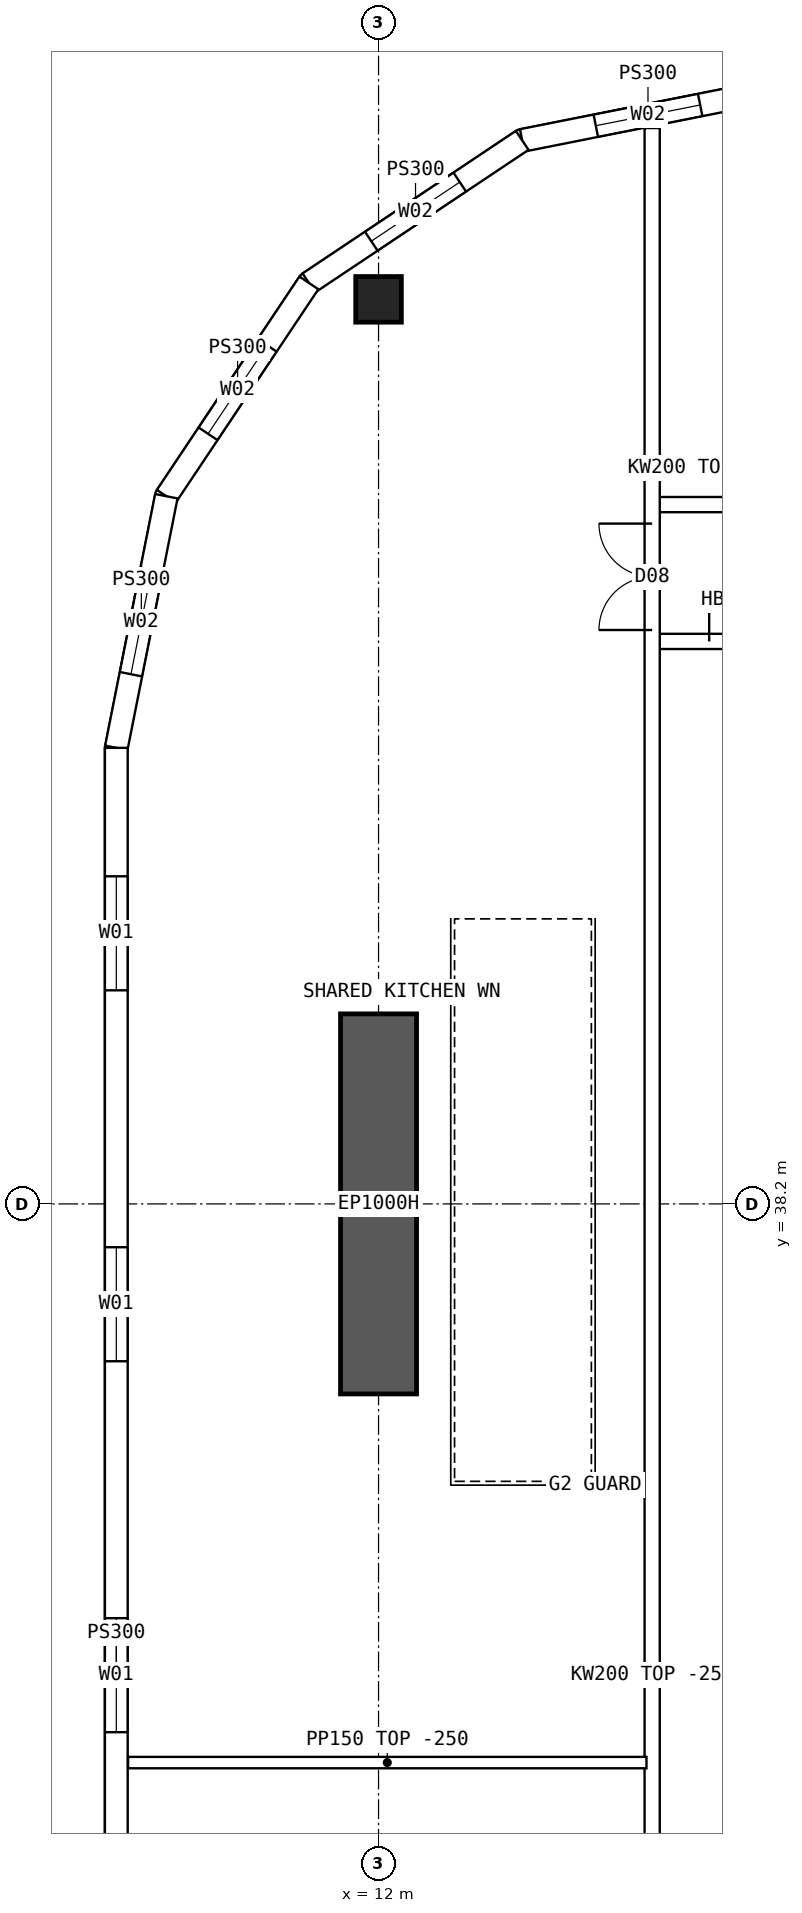
"""IFC4 building model, lengths in metres.
Left out: names, types, materials, properties, quantities, classifications, styles, units other than length and angle.
Written with IfcOpenShell. Run it as: python <this file> out.ifc"""

import sys

from ifc_helpers import new_model, si_unit, direction, frame, frame_2d, origin, origin_2d, place, context, subcontext, project, spatial, polyline, rectangle, hollow_rectangle, outline, extrude, element, fill, save


model = new_model("IFC4")
c1 = context("Model", 3, precision=1e-05, world=origin(), true_north=direction((0.0, 1.0)))
c2 = subcontext(c1, "Body", "Model", "MODEL_VIEW")
j1 = project(units=[si_unit("LENGTHUNIT", "METRE"), si_unit("PLANEANGLEUNIT", "RADIAN")], contexts=[c1])
p1 = place(None, origin())
s1 = spatial("IfcSite", under=j1, at=p1, CompositionType="ELEMENT")
p2 = place(p1, origin())
s2 = spatial("IfcBuilding", under=s1, at=p2, CompositionType="ELEMENT")
p3 = place(p2, frame((0.0, 0.0, 220.3)))
s3 = spatial("IfcBuildingStorey", under=s2, at=p3, CompositionType="ELEMENT", Elevation=220.3)
p4 = place(p3, frame((12.0, 50.1, 0.0), z_axis=(0.0, 0.0, 1.0), x_axis=(1.0, 0.0, 0.0)))
e1 = element("IfcColumn", 1, at=p4, inside=s3, PredefinedType="COLUMN", context=c2, shape_type="SweptSolid", body=[
    extrude(hollow_rectangle(XDim=0.6, YDim=0.6, WallThickness=0.06, at=origin_2d()), origin(), (0.0, 0.0, 1.0), 3.75),
])
p5 = place(p3, frame((12.0, 35.7, 0.0), z_axis=(0.0, 0.0, 1.0), x_axis=(0.0, 1.0, 0.0)))
e2 = element("IfcWall", 2, at=p5, inside=s3, PredefinedType="SHEAR", context=c2, shape_type="SweptSolid", body=[
    extrude(rectangle(XDim=5.0, YDim=1.0, at=frame_2d((2.5, 0.0))), origin(), (0.0, 0.0, 1.0), 3.75),
])
p6 = place(p3, frame((8.55, 44.2, 0.0), z_axis=(0.0, 0.0, 1.0), x_axis=(0.0, -1.0, 0.0)))
e3 = element("IfcWall", 3, at=p6, inside=s3, PredefinedType="SOLIDWALL", context=c2, shape_type="SweptSolid", body=[
    extrude(outline(polyline([(-0.015, -0.15), (24.415, -0.15), (24.385, 0.15), (0.015, 0.15), (-0.015, -0.15)])), origin(), (0.0, 0.0, 1.0), 3.5),
])
p7 = place(p6, frame((1.69, 0.0, 0.9)))
e4 = element("IfcOpeningElement", 4, at=p7, cuts=e3, PredefinedType="OPENING", context=c2, shape_type="SweptSolid", body=[
    extrude(rectangle(XDim=1.5, YDim=2.0, at=frame_2d((0.75, 1.0))), frame((0.0, 0.16, 0.0), z_axis=(0.0, -1.0, 0.0), x_axis=(1.0, 0.0, 0.0)), (0.0, 0.0, 1.0), 0.32),
])
p8 = place(p6, frame((6.57, 0.0, 0.9)))
e5 = element("IfcOpeningElement", 5, at=p8, cuts=e3, PredefinedType="OPENING", context=c2, shape_type="SweptSolid", body=[
    extrude(rectangle(XDim=1.5, YDim=2.0, at=frame_2d((0.75, 1.0))), frame((0.0, 0.16, 0.0), z_axis=(0.0, -1.0, 0.0), x_axis=(1.0, 0.0, 0.0)), (0.0, 0.0, 1.0), 0.32),
])
p9 = place(p6, frame((11.45, 0.0, 0.9)))
e6 = element("IfcOpeningElement", 6, at=p9, cuts=e3, PredefinedType="OPENING", context=c2, shape_type="SweptSolid", body=[
    extrude(rectangle(XDim=1.5, YDim=2.0, at=frame_2d((0.75, 1.0))), frame((0.0, 0.16, 0.0), z_axis=(0.0, -1.0, 0.0), x_axis=(1.0, 0.0, 0.0)), (0.0, 0.0, 1.0), 0.32),
])
p10 = place(p6, frame((16.33, 0.0, 0.9)))
e7 = element("IfcOpeningElement", 7, at=p10, cuts=e3, PredefinedType="OPENING", context=c2, shape_type="SweptSolid", body=[
    extrude(rectangle(XDim=1.5, YDim=2.0, at=frame_2d((0.75, 1.0))), frame((0.0, 0.16, 0.0), z_axis=(0.0, -1.0, 0.0), x_axis=(1.0, 0.0, 0.0)), (0.0, 0.0, 1.0), 0.32),
])
p11 = place(p6, frame((21.21, 0.0, 0.9)))
e8 = element("IfcOpeningElement", 8, at=p11, cuts=e3, PredefinedType="OPENING", context=c2, shape_type="SweptSolid", body=[
    extrude(rectangle(XDim=1.5, YDim=2.0, at=frame_2d((0.75, 1.0))), frame((0.0, 0.16, 0.0), z_axis=(0.0, -1.0, 0.0), x_axis=(1.0, 0.0, 0.0)), (0.0, 0.0, 1.0), 0.32),
])
p12 = place(p3, frame((17.2, 52.85, 0.0), z_axis=(0.0, 0.0, 1.0), x_axis=(-0.98078325777, -0.195100490205, 0.0)))
e9 = element("IfcWall", 9, at=p12, inside=s3, PredefinedType="SOLIDWALL", context=c2, shape_type="SweptSolid", body=[
    extrude(outline(polyline([(-0.03, -0.15), (3.405, -0.15), (3.345, 0.15), (0.03, 0.15), (-0.03, -0.15)])), origin(), (0.0, 0.0, 1.0), 3.5),
])
p13 = place(p12, frame((0.988, 0.0, 0.9)))
e10 = element("IfcOpeningElement", 10, at=p13, cuts=e9, PredefinedType="OPENING", context=c2, shape_type="SweptSolid", body=[
    extrude(rectangle(XDim=1.4, YDim=1.8, at=frame_2d((0.7, 0.9))), frame((0.0, 0.16, 0.0), z_axis=(0.0, -1.0, 0.0), x_axis=(1.0, 0.0, 0.0)), (0.0, 0.0, 1.0), 0.32),
])
p14 = place(p3, frame((13.89, 52.192, 0.0), z_axis=(0.0, 0.0, 1.0), x_axis=(-0.831460037396, -0.555584562613, 0.0)))
e11 = element("IfcWall", 11, at=p14, inside=s3, PredefinedType="SOLIDWALL", context=c2, shape_type="SweptSolid", body=[
    extrude(outline(polyline([(-0.03, -0.15), (3.405, -0.15), (3.345, 0.15), (0.03, 0.15), (-0.03, -0.15)])), origin(), (0.0, 0.0, 1.0), 3.5),
])
p15 = place(p14, frame((0.988, 0.0, 0.9)))
e12 = element("IfcOpeningElement", 12, at=p15, cuts=e11, PredefinedType="OPENING", context=c2, shape_type="SweptSolid", body=[
    extrude(rectangle(XDim=1.4, YDim=1.8, at=frame_2d((0.7, 0.9))), frame((0.0, 0.16, 0.0), z_axis=(0.0, -1.0, 0.0), x_axis=(1.0, 0.0, 0.0)), (0.0, 0.0, 1.0), 0.32),
])
p16 = place(p3, frame((11.083, 50.316, 0.0), z_axis=(0.0, 0.0, 1.0), x_axis=(-0.555567969291, -0.831471124873, 0.0)))
e13 = element("IfcWall", 13, at=p16, inside=s3, PredefinedType="SOLIDWALL", context=c2, shape_type="SweptSolid", body=[
    extrude(outline(polyline([(-0.03, -0.15), (3.405, -0.15), (3.345, 0.15), (0.03, 0.15), (-0.03, -0.15)])), origin(), (0.0, 0.0, 1.0), 3.5),
])
p17 = place(p16, frame((0.988, 0.0, 0.9)))
e14 = element("IfcOpeningElement", 14, at=p17, cuts=e13, PredefinedType="OPENING", context=c2, shape_type="SweptSolid", body=[
    extrude(rectangle(XDim=1.4, YDim=1.8, at=frame_2d((0.7, 0.9))), frame((0.0, 0.16, 0.0), z_axis=(0.0, -1.0, 0.0), x_axis=(1.0, 0.0, 0.0)), (0.0, 0.0, 1.0), 0.32),
])
p18 = place(p3, frame((9.208, 47.51, 0.0), z_axis=(0.0, 0.0, 1.0), x_axis=(-0.19508664885, -0.980786011034, 0.0)))
e15 = element("IfcWall", 15, at=p18, inside=s3, PredefinedType="SOLIDWALL", context=c2, shape_type="SweptSolid", body=[
    extrude(outline(polyline([(-0.03, -0.15), (3.39, -0.15), (3.36, 0.15), (0.03, 0.15), (-0.03, -0.15)])), origin(), (0.0, 0.0, 1.0), 3.5),
])
p19 = place(p18, frame((0.988, 0.0, 0.9)))
e16 = element("IfcOpeningElement", 16, at=p19, cuts=e15, PredefinedType="OPENING", context=c2, shape_type="SweptSolid", body=[
    extrude(rectangle(XDim=1.4, YDim=1.8, at=frame_2d((0.7, 0.9))), frame((0.0, 0.16, 0.0), z_axis=(0.0, -1.0, 0.0), x_axis=(1.0, 0.0, 0.0)), (0.0, 0.0, 1.0), 0.32),
])
p20 = place(p3, frame((15.6, 47.4, 0.0), z_axis=(0.0, 0.0, 1.0), x_axis=(1.0, 0.0, 0.0)))
e17 = element("IfcWall", 17, at=p20, inside=s3, PredefinedType="SOLIDWALL", context=c2, shape_type="SweptSolid", body=[
    extrude(rectangle(XDim=2.05, YDim=0.2, at=frame_2d((1.025, 0.0))), origin(), (0.0, 0.0, 1.0), 3.5),
])
p21 = place(p20, frame((0.95, 0.0, 0.0)))
e18 = element("IfcOpeningElement", 18, at=p21, cuts=e17, PredefinedType="OPENING", context=c2, shape_type="SweptSolid", body=[
    extrude(rectangle(XDim=0.9, YDim=2.1, at=frame_2d((0.45, 1.05))), frame((0.0, 0.11, 0.0), z_axis=(0.0, -1.0, 0.0), x_axis=(1.0, 0.0, 0.0)), (0.0, 0.0, 1.0), 0.22),
])
p22 = place(p3, frame((15.6, 45.6, 0.0), z_axis=(0.0, 0.0, 1.0), x_axis=(1.0, 0.0, 0.0)))
e19 = element("IfcWall", 19, at=p22, inside=s3, PredefinedType="SOLIDWALL", context=c2, shape_type="SweptSolid", body=[
    extrude(rectangle(XDim=2.05, YDim=0.2, at=frame_2d((1.025, 0.0))), origin(), (0.0, 0.0, 1.0), 3.5),
])
p23 = place(p22, frame((0.75, 0.0, 0.0)))
e20 = element("IfcOpeningElement", 20, at=p23, cuts=e19, PredefinedType="OPENING", context=c2, shape_type="SweptSolid", body=[
    extrude(rectangle(XDim=1.2, YDim=2.1, at=frame_2d((0.6, 1.05))), frame((0.0, 0.11, 0.0), z_axis=(0.0, -1.0, 0.0), x_axis=(1.0, 0.0, 0.0)), (0.0, 0.0, 1.0), 0.22),
])
p24 = place(p3, frame((8.705, 30.85, 0.0), z_axis=(0.0, 0.0, 1.0), x_axis=(1.0, 0.0, 0.0)))
e21 = element("IfcWall", 21, at=p24, inside=s3, PredefinedType="PARTITIONING", context=c2, shape_type="SweptSolid", body=[
    extrude(outline(polyline([(0.0, 0.0), (6.82, 0.0), (6.82, 3.5), (3.597, 3.5), (3.595, 3.05), (2.997, 3.05), (2.995, 3.5), (0.0, 3.5), (0.0, 0.0)])), frame((0.0, 0.075, 0.0), z_axis=(0.0, -1.0, 0.0), x_axis=(1.0, 0.0, 0.0)), (0.0, 0.0, 1.0), 0.15),
])
p25 = place(p3, frame((15.6, 11.646, 0.0), z_axis=(0.0, 0.0, 1.0), x_axis=(0.0, 1.0, 0.0)))
e22 = element("IfcWall", 22, at=p25, inside=s3, PredefinedType="SOLIDWALL", context=c2, shape_type="SweptSolid", body=[
    extrude(rectangle(XDim=40.708, YDim=0.2, at=frame_2d((20.354, 0.0))), origin(), (0.0, 0.0, 1.0), 3.5),
])
p26 = place(p25, frame((13.434, 0.0, 0.0)))
e23 = element("IfcOpeningElement", 23, at=p26, cuts=e22, PredefinedType="OPENING", context=c2, shape_type="SweptSolid", body=[
    extrude(rectangle(XDim=1.2, YDim=2.1, at=frame_2d((0.6, 1.05))), frame((0.0, 0.11, 0.0), z_axis=(0.0, -1.0, 0.0), x_axis=(1.0, 0.0, 0.0)), (0.0, 0.0, 1.0), 0.22),
])
p27 = place(p25, frame((5.104, 0.0, 0.0)))
e24 = element("IfcOpeningElement", 24, at=p27, cuts=e22, PredefinedType="OPENING", context=c2, shape_type="SweptSolid", body=[
    extrude(rectangle(XDim=1.4, YDim=2.1, at=frame_2d((0.7, 1.05))), frame((0.0, 0.11, 0.0), z_axis=(0.0, -1.0, 0.0), x_axis=(1.0, 0.0, 0.0)), (0.0, 0.0, 1.0), 0.22),
])
p28 = place(p25, frame((34.104, 0.0, 0.0)))
e25 = element("IfcOpeningElement", 25, at=p28, cuts=e22, PredefinedType="OPENING", context=c2, shape_type="SweptSolid", body=[
    extrude(rectangle(XDim=1.4, YDim=2.1, at=frame_2d((0.7, 1.05))), frame((0.0, 0.11, 0.0), z_axis=(0.0, -1.0, 0.0), x_axis=(1.0, 0.0, 0.0)), (0.0, 0.0, 1.0), 0.22),
])
p29 = place(p7, origin())
e26 = element("IfcWindow", 26, at=p29, inside=s3, PartitioningType="SINGLE_PANEL", PredefinedType="WINDOW", context=c2, shape_type="SweptSolid", body=[
    extrude(rectangle(XDim=1.5, YDim=2.0, at=frame_2d((0.75, 1.0))), frame((0.0, 0.03, 0.0), z_axis=(0.0, -1.0, 0.0), x_axis=(1.0, 0.0, 0.0)), (0.0, 0.0, 1.0), 0.06),
])
fill(e4, e26)
p30 = place(p8, origin())
e27 = element("IfcWindow", 27, at=p30, inside=s3, PartitioningType="SINGLE_PANEL", PredefinedType="WINDOW", context=c2, shape_type="SweptSolid", body=[
    extrude(rectangle(XDim=1.5, YDim=2.0, at=frame_2d((0.75, 1.0))), frame((0.0, 0.03, 0.0), z_axis=(0.0, -1.0, 0.0), x_axis=(1.0, 0.0, 0.0)), (0.0, 0.0, 1.0), 0.06),
])
fill(e5, e27)
p31 = place(p9, origin())
e28 = element("IfcWindow", 28, at=p31, inside=s3, PartitioningType="SINGLE_PANEL", PredefinedType="WINDOW", context=c2, shape_type="SweptSolid", body=[
    extrude(rectangle(XDim=1.5, YDim=2.0, at=frame_2d((0.75, 1.0))), frame((0.0, 0.03, 0.0), z_axis=(0.0, -1.0, 0.0), x_axis=(1.0, 0.0, 0.0)), (0.0, 0.0, 1.0), 0.06),
])
fill(e6, e28)
p32 = place(p13, origin())
e29 = element("IfcWindow", 29, at=p32, inside=s3, PartitioningType="SINGLE_PANEL", PredefinedType="WINDOW", context=c2, shape_type="SweptSolid", body=[
    extrude(rectangle(XDim=1.4, YDim=1.8, at=frame_2d((0.7, 0.9))), frame((0.0, 0.03, 0.0), z_axis=(0.0, -1.0, 0.0), x_axis=(1.0, 0.0, 0.0)), (0.0, 0.0, 1.0), 0.06),
])
fill(e10, e29)
p33 = place(p15, origin())
e30 = element("IfcWindow", 30, at=p33, inside=s3, PartitioningType="SINGLE_PANEL", PredefinedType="WINDOW", context=c2, shape_type="SweptSolid", body=[
    extrude(rectangle(XDim=1.4, YDim=1.8, at=frame_2d((0.7, 0.9))), frame((0.0, 0.03, 0.0), z_axis=(0.0, -1.0, 0.0), x_axis=(1.0, 0.0, 0.0)), (0.0, 0.0, 1.0), 0.06),
])
fill(e12, e30)
p34 = place(p17, origin())
e31 = element("IfcWindow", 31, at=p34, inside=s3, PartitioningType="SINGLE_PANEL", PredefinedType="WINDOW", context=c2, shape_type="SweptSolid", body=[
    extrude(rectangle(XDim=1.4, YDim=1.8, at=frame_2d((0.7, 0.9))), frame((0.0, 0.03, 0.0), z_axis=(0.0, -1.0, 0.0), x_axis=(1.0, 0.0, 0.0)), (0.0, 0.0, 1.0), 0.06),
])
fill(e14, e31)
p35 = place(p19, origin())
e32 = element("IfcWindow", 32, at=p35, inside=s3, PartitioningType="SINGLE_PANEL", PredefinedType="WINDOW", context=c2, shape_type="SweptSolid", body=[
    extrude(rectangle(XDim=1.4, YDim=1.8, at=frame_2d((0.7, 0.9))), frame((0.0, 0.03, 0.0), z_axis=(0.0, -1.0, 0.0), x_axis=(1.0, 0.0, 0.0)), (0.0, 0.0, 1.0), 0.06),
])
fill(e16, e32)
p36 = place(p23, origin())
e33 = element("IfcDoor", 33, at=p36, inside=s3, OperationType="DOUBLE_DOOR_SINGLE_SWING", PredefinedType="DOOR", context=c2, shape_type="SweptSolid", body=[
    extrude(rectangle(XDim=1.2, YDim=2.1, at=frame_2d((0.6, 1.05))), frame((0.0, 0.025, 0.0), z_axis=(0.0, -1.0, 0.0), x_axis=(1.0, 0.0, 0.0)), (0.0, 0.0, 1.0), 0.05),
])
fill(e20, e33)
p37 = place(p28, origin())
e34 = element("IfcDoor", 34, at=p37, inside=s3, OperationType="DOUBLE_DOOR_SINGLE_SWING", PredefinedType="DOOR", context=c2, shape_type="SweptSolid", body=[
    extrude(rectangle(XDim=1.4, YDim=2.1, at=frame_2d((0.7, 1.05))), frame((0.0, 0.025, 0.0), z_axis=(0.0, -1.0, 0.0), x_axis=(1.0, 0.0, 0.0)), (0.0, 0.0, 1.0), 0.05),
])
fill(e25, e34)
save(model, sys.argv[1])
